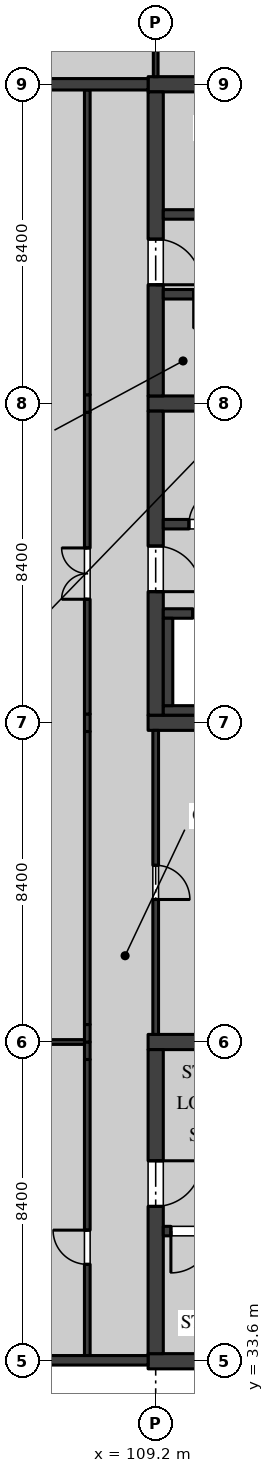
"""IFC4 building model, lengths in metres.
Left out: names, types, materials, properties, quantities, classifications, styles, units other than length and angle.
Written with IfcOpenShell. Run it as: python <this file> out.ifc"""

import sys

from ifc_helpers import new_model, si_unit, direction, frame, frame_2d, origin, place, context, subcontext, project, spatial, rectangle, extrude, element, fill, save


model = new_model("IFC4")
c1 = context("Model", 3, precision=1e-05, world=origin(), true_north=direction((0.0, 1.0)))
c2 = subcontext(c1, "Body", "Model", "MODEL_VIEW")
j1 = project(units=[si_unit("LENGTHUNIT", "METRE"), si_unit("PLANEANGLEUNIT", "RADIAN")], contexts=[c1])
p1 = place(None, origin())
s1 = spatial("IfcSite", under=j1, at=p1, CompositionType="ELEMENT")
p2 = place(p1, origin())
s2 = spatial("IfcBuilding", under=s1, at=p2, CompositionType="ELEMENT")
p3 = place(p2, frame((0.0, 0.0, 9.9)))
s3 = spatial("IfcBuildingStorey", under=s2, at=p3, CompositionType="ELEMENT", Elevation=9.9)
p4 = place(p3, frame((109.0, 50.4, 0.0), z_axis=(0.0, 0.0, 1.0), x_axis=(1.0, 0.0, 0.0)))
e1 = element("IfcWall", 1, at=p4, inside=s3, PredefinedType="SHEAR", context=c2, shape_type="SweptSolid", body=[
    extrude(rectangle(XDim=8.8, YDim=0.4, at=frame_2d((4.4, 0.0))), origin(), (0.0, 0.0, 1.0), 4.37),
])
p5 = place(p3, frame((109.0, 58.8, 0.0), z_axis=(0.0, 0.0, 1.0), x_axis=(1.0, 0.0, 0.0)))
e2 = element("IfcWall", 2, at=p5, inside=s3, PredefinedType="SHEAR", context=c2, shape_type="SweptSolid", body=[
    extrude(rectangle(XDim=8.8, YDim=0.4, at=frame_2d((4.4, 0.0))), origin(), (0.0, 0.0, 1.0), 4.37),
])
p6 = place(p5, frame((6.65, 0.0, 0.0)))
e3 = element("IfcOpeningElement", 3, at=p6, cuts=e2, PredefinedType="OPENING", context=c2, shape_type="SweptSolid", body=[
    extrude(rectangle(XDim=1.1, YDim=2.1, at=frame_2d((0.55, 1.05))), frame((0.0, 0.21, 0.0), z_axis=(0.0, -1.0, 0.0), x_axis=(1.0, 0.0, 0.0)), (0.0, 0.0, 1.0), 0.42),
])
p7 = place(p3, frame((109.2, 50.6, 0.0), z_axis=(0.0, 0.0, 1.0), x_axis=(0.0, 1.0, 0.0)))
e4 = element("IfcWall", 4, at=p7, inside=s3, PredefinedType="SHEAR", context=c2, shape_type="SweptSolid", body=[
    extrude(rectangle(XDim=8.0, YDim=0.4, at=frame_2d((4.0, 0.0))), origin(), (0.0, 0.0, 1.0), 4.37),
])
p8 = place(p7, frame((3.25, 0.0, 0.0)))
e5 = element("IfcOpeningElement", 5, at=p8, cuts=e4, PredefinedType="OPENING", context=c2, shape_type="SweptSolid", body=[
    extrude(rectangle(XDim=1.2, YDim=2.1, at=frame_2d((0.6, 1.05))), frame((0.0, 0.21, 0.0), z_axis=(0.0, -1.0, 0.0), x_axis=(1.0, 0.0, 0.0)), (0.0, 0.0, 1.0), 0.42),
])
p9 = place(p3, frame((109.4, 55.625, 0.0), z_axis=(0.0, 0.0, 1.0), x_axis=(1.0, 0.0, 0.0)))
e6 = element("IfcWall", 6, at=p9, inside=s3, PredefinedType="SOLIDWALL", context=c2, shape_type="SweptSolid", body=[
    extrude(rectangle(XDim=2.25, YDim=0.25, at=frame_2d((1.125, 0.0))), origin(), (0.0, 0.0, 1.0), 4.37),
])
p10 = place(p9, frame((0.675, 0.0, 0.0)))
e7 = element("IfcOpeningElement", 7, at=p10, cuts=e6, PredefinedType="OPENING", context=c2, shape_type="SweptSolid", body=[
    extrude(rectangle(XDim=0.9, YDim=2.1, at=frame_2d((0.45, 1.05))), frame((0.0, 0.135, 0.0), z_axis=(0.0, -1.0, 0.0), x_axis=(1.0, 0.0, 0.0)), (0.0, 0.0, 1.0), 0.27),
])
p11 = place(p3, frame((109.0, 67.2, 0.0), z_axis=(0.0, 0.0, 1.0), x_axis=(1.0, 0.0, 0.0)))
e8 = element("IfcWall", 8, at=p11, inside=s3, PredefinedType="SHEAR", context=c2, shape_type="SweptSolid", body=[
    extrude(rectangle(XDim=8.8, YDim=0.4, at=frame_2d((4.4, 0.0))), origin(), (0.0, 0.0, 1.0), 4.37),
])
p12 = place(p3, frame((109.2, 59.0, 0.0), z_axis=(0.0, 0.0, 1.0), x_axis=(0.0, 1.0, 0.0)))
e9 = element("IfcWall", 9, at=p12, inside=s3, PredefinedType="SHEAR", context=c2, shape_type="SweptSolid", body=[
    extrude(rectangle(XDim=8.0, YDim=0.4, at=frame_2d((4.0, 0.0))), origin(), (0.0, 0.0, 1.0), 4.37),
])
p13 = place(p12, frame((2.925, 0.0, 0.0)))
e10 = element("IfcOpeningElement", 10, at=p13, cuts=e9, PredefinedType="OPENING", context=c2, shape_type="SweptSolid", body=[
    extrude(rectangle(XDim=1.2, YDim=2.1, at=frame_2d((0.6, 1.05))), frame((0.0, 0.21, 0.0), z_axis=(0.0, -1.0, 0.0), x_axis=(1.0, 0.0, 0.0)), (0.0, 0.0, 1.0), 0.42),
])
p14 = place(p3, frame((117.4, 63.775, 0.0), z_axis=(0.0, 0.0, 1.0), x_axis=(-1.0, 0.0, 0.0)))
e11 = element("IfcWall", 11, at=p14, inside=s3, PredefinedType="SOLIDWALL", context=c2, shape_type="SweptSolid", body=[
    extrude(rectangle(XDim=8.0, YDim=0.25, at=frame_2d((4.0, 0.0))), origin(), (0.0, 0.0, 1.0), 4.37),
])
p15 = place(p14, frame((0.2, 0.0, 0.0)))
e12 = element("IfcOpeningElement", 12, at=p15, cuts=e11, PredefinedType="OPENING", context=c2, shape_type="SweptSolid", body=[
    extrude(rectangle(XDim=1.1, YDim=2.1, at=frame_2d((0.55, 1.05))), frame((0.0, 0.135, 0.0), z_axis=(0.0, -1.0, 0.0), x_axis=(1.0, 0.0, 0.0)), (0.0, 0.0, 1.0), 0.27),
])
p16 = place(p3, frame((114.75, 61.675, 0.0), z_axis=(0.0, 0.0, 1.0), x_axis=(-1.0, 0.0, 0.0)))
e13 = element("IfcWall", 13, at=p16, inside=s3, PredefinedType="SOLIDWALL", context=c2, shape_type="SweptSolid", body=[
    extrude(rectangle(XDim=5.35, YDim=0.25, at=frame_2d((2.675, 0.0))), origin(), (0.0, 0.0, 1.0), 4.37),
])
p17 = place(p16, frame((3.65, 0.0, 0.0)))
e14 = element("IfcOpeningElement", 14, at=p17, cuts=e13, PredefinedType="OPENING", context=c2, shape_type="SweptSolid", body=[
    extrude(rectangle(XDim=0.9, YDim=2.1, at=frame_2d((0.45, 1.05))), frame((0.0, 0.135, 0.0), z_axis=(0.0, -1.0, 0.0), x_axis=(1.0, 0.0, 0.0)), (0.0, 0.0, 1.0), 0.27),
])
p18 = place(p16, frame((0.9, 0.0, 0.0)))
e15 = element("IfcOpeningElement", 15, at=p18, cuts=e13, PredefinedType="OPENING", context=c2, shape_type="SweptSolid", body=[
    extrude(rectangle(XDim=0.8, YDim=2.1, at=frame_2d((0.4, 1.05))), frame((0.0, 0.135, 0.0), z_axis=(0.0, -1.0, 0.0), x_axis=(1.0, 0.0, 0.0)), (0.0, 0.0, 1.0), 0.27),
])
for number, where, z_axis, x_axis in (
    (16, (109.0, 33.6, 0.0), (0.0, 0.0, 1.0), (1.0, 0.0, 0.0)),
    (17, (109.0, 42.0, 0.0), (0.0, 0.0, 1.0), (1.0, 0.0, 0.0)),
):
    element("IfcWall", number, at=place(p3, frame(where, z_axis=z_axis, x_axis=x_axis)), inside=s3, PredefinedType="SHEAR", context=c2, shape_type="SweptSolid", body=[
        extrude(rectangle(XDim=8.8, YDim=0.4, at=frame_2d((4.4, 0.0))), origin(), (0.0, 0.0, 1.0), 4.37),
    ])
p19 = place(p3, frame((109.2, 33.8, 0.0), z_axis=(0.0, 0.0, 1.0), x_axis=(0.0, 1.0, 0.0)))
e18 = element("IfcWall", 18, at=p19, inside=s3, PredefinedType="SHEAR", context=c2, shape_type="SweptSolid", body=[
    extrude(rectangle(XDim=8.0, YDim=0.4, at=frame_2d((4.0, 0.0))), origin(), (0.0, 0.0, 1.0), 4.37),
])
p20 = place(p19, frame((3.875, 0.0, 0.0)))
e19 = element("IfcOpeningElement", 19, at=p20, cuts=e18, PredefinedType="OPENING", context=c2, shape_type="SweptSolid", body=[
    extrude(rectangle(XDim=1.2, YDim=2.1, at=frame_2d((0.6, 1.05))), frame((0.0, 0.21, 0.0), z_axis=(0.0, -1.0, 0.0), x_axis=(1.0, 0.0, 0.0)), (0.0, 0.0, 1.0), 0.42),
])
p21 = place(p3, frame((109.4, 37.025, 0.0), z_axis=(0.0, 0.0, 1.0), x_axis=(1.0, 0.0, 0.0)))
e20 = element("IfcWall", 20, at=p21, inside=s3, PredefinedType="SOLIDWALL", context=c2, shape_type="SweptSolid", body=[
    extrude(rectangle(XDim=8.0, YDim=0.25, at=frame_2d((4.0, 0.0))), origin(), (0.0, 0.0, 1.0), 4.37),
])
p22 = place(p21, frame((0.2, 0.0, 0.0)))
e21 = element("IfcOpeningElement", 21, at=p22, cuts=e20, PredefinedType="OPENING", context=c2, shape_type="SweptSolid", body=[
    extrude(rectangle(XDim=1.1, YDim=2.1, at=frame_2d((0.55, 1.05))), frame((0.0, 0.135, 0.0), z_axis=(0.0, -1.0, 0.0), x_axis=(1.0, 0.0, 0.0)), (0.0, 0.0, 1.0), 0.27),
])
p23 = place(p3, frame((109.4, 53.275, 0.0), z_axis=(0.0, 0.0, 1.0), x_axis=(1.0, 0.0, 0.0)))
e22 = element("IfcWall", 22, at=p23, inside=s3, PredefinedType="SOLIDWALL", context=c2, shape_type="SweptSolid", body=[
    extrude(rectangle(XDim=2.65, YDim=0.25, at=frame_2d((1.325, 0.0))), origin(), (0.0, 0.0, 1.0), 4.37),
])
p24 = place(p23, frame((0.775, 0.0, 0.0)))
e23 = element("IfcOpeningElement", 23, at=p24, cuts=e22, PredefinedType="OPENING", context=c2, shape_type="SweptSolid", body=[
    extrude(rectangle(XDim=1.1, YDim=2.1, at=frame_2d((0.55, 1.05))), frame((0.0, 0.135, 0.0), z_axis=(0.0, -1.0, 0.0), x_axis=(1.0, 0.0, 0.0)), (0.0, 0.0, 1.0), 0.27),
])
p25 = place(p3, frame((109.4, 50.725, 0.0), z_axis=(0.0, 0.0, 1.0), x_axis=(1.0, 0.0, 0.0)))
e24 = element("IfcWall", 24, at=p25, inside=s3, PredefinedType="SOLIDWALL", context=c2, shape_type="SweptSolid", body=[
    extrude(rectangle(XDim=2.65, YDim=0.25, at=frame_2d((1.325, 0.0))), origin(), (0.0, 0.0, 1.0), 4.37),
])
p26 = place(p3, frame((109.525, 50.85, 0.0), z_axis=(0.0, 0.0, 1.0), x_axis=(0.0, 1.0, 0.0)))
e25 = element("IfcWall", 25, at=p26, inside=s3, PredefinedType="SOLIDWALL", context=c2, shape_type="SweptSolid", body=[
    extrude(rectangle(XDim=2.3, YDim=0.25, at=frame_2d((1.15, 0.0))), origin(), (0.0, 0.0, 1.0), 4.37),
])
p27 = place(p3, frame((109.2, 42.2, 0.0), z_axis=(0.0, 0.0, 1.0), x_axis=(0.0, 1.0, 0.0)))
e26 = element("IfcWall", 26, at=p27, inside=s3, PredefinedType="PARTITIONING", context=c2, shape_type="SweptSolid", body=[
    extrude(rectangle(XDim=8.0, YDim=0.15, at=frame_2d((4.0, 0.0))), origin(), (0.0, 0.0, 1.0), 3.746),
])
p28 = place(p27, frame((3.55, 0.0, 0.0)))
e27 = element("IfcOpeningElement", 27, at=p28, cuts=e26, PredefinedType="OPENING", context=c2, shape_type="SweptSolid", body=[
    extrude(rectangle(XDim=0.9, YDim=2.1, at=frame_2d((0.45, 1.05))), frame((0.0, 0.085, 0.0), z_axis=(0.0, -1.0, 0.0), x_axis=(1.0, 0.0, 0.0)), (0.0, 0.0, 1.0), 0.17),
])
p29 = place(p3, frame((107.4, 33.75, 0.0), z_axis=(0.0, 0.0, 1.0), x_axis=(0.0, 1.0, 0.0)))
e28 = element("IfcWall", 28, at=p29, inside=s3, PredefinedType="PARTITIONING", context=c2, shape_type="SweptSolid", body=[
    extrude(rectangle(XDim=7.79, YDim=0.15, at=frame_2d((3.895, 0.0))), origin(), (0.0, 0.0, 1.0), 4.37),
])
p30 = place(p29, frame((2.4, 0.0, 0.0)))
e29 = element("IfcOpeningElement", 29, at=p30, cuts=e28, PredefinedType="OPENING", context=c2, shape_type="SweptSolid", body=[
    extrude(rectangle(XDim=0.9, YDim=2.1, at=frame_2d((0.45, 1.05))), frame((0.0, 0.085, 0.0), z_axis=(0.0, -1.0, 0.0), x_axis=(1.0, 0.0, 0.0)), (0.0, 0.0, 1.0), 0.17),
])
for number, where, z_axis, x_axis in (
    (30, (107.4, 41.54, 0.0), (0.0, 0.0, 1.0), (0.0, 1.0, 0.0)),
    (31, (107.4, 42.0, 0.0), (0.0, 0.0, 1.0), (0.0, 1.0, 0.0)),
):
    element("IfcWall", number, at=place(p3, frame(where, z_axis=z_axis, x_axis=x_axis)), inside=s3, PredefinedType="PARTITIONING", context=c2, shape_type="SweptSolid", body=[
        extrude(rectangle(XDim=0.46, YDim=0.15, at=frame_2d((0.23, 0.0))), origin(), (0.0, 0.0, 1.0), 3.746),
    ])
p31 = place(p3, frame((107.4, 42.46, 0.0), z_axis=(0.0, 0.0, 1.0), x_axis=(0.0, 1.0, 0.0)))
e32 = element("IfcWall", 32, at=p31, inside=s3, PredefinedType="PARTITIONING", context=c2, shape_type="SweptSolid", body=[
    extrude(rectangle(XDim=7.71, YDim=0.15, at=frame_2d((3.855, 0.0))), origin(), (0.0, 0.0, 1.0), 4.37),
])
p32 = place(p3, frame((107.4, 50.17, 0.0), z_axis=(0.0, 0.0, 1.0), x_axis=(0.0, 1.0, 0.0)))
e33 = element("IfcWall", 33, at=p32, inside=s3, PredefinedType="PARTITIONING", context=c2, shape_type="SweptSolid", body=[
    extrude(rectangle(XDim=0.46, YDim=0.15, at=frame_2d((0.23, 0.0))), origin(), (0.0, 0.0, 1.0), 3.746),
])
p33 = place(p3, frame((107.4, 50.63, 0.0), z_axis=(0.0, 0.0, 1.0), x_axis=(0.0, 1.0, 0.0)))
e34 = element("IfcWall", 34, at=p33, inside=s3, PredefinedType="PARTITIONING", context=c2, shape_type="SweptSolid", body=[
    extrude(rectangle(XDim=7.94, YDim=0.15, at=frame_2d((3.97, 0.0))), origin(), (0.0, 0.0, 1.0), 4.37),
])
p34 = place(p33, frame((3.02, 0.0, 0.0)))
e35 = element("IfcOpeningElement", 35, at=p34, cuts=e34, PredefinedType="OPENING", context=c2, shape_type="SweptSolid", body=[
    extrude(rectangle(XDim=1.35, YDim=2.1, at=frame_2d((0.675, 1.05))), frame((0.0, 0.085, 0.0), z_axis=(0.0, -1.0, 0.0), x_axis=(1.0, 0.0, 0.0)), (0.0, 0.0, 1.0), 0.17),
])
p35 = place(p3, frame((107.4, 58.57, 0.0), z_axis=(0.0, 0.0, 1.0), x_axis=(0.0, 1.0, 0.0)))
e36 = element("IfcWall", 36, at=p35, inside=s3, PredefinedType="PARTITIONING", context=c2, shape_type="SweptSolid", body=[
    extrude(rectangle(XDim=0.46, YDim=0.15, at=frame_2d((0.23, 0.0))), origin(), (0.0, 0.0, 1.0), 3.746),
])
p36 = place(p3, frame((107.4, 59.03, 0.0), z_axis=(0.0, 0.0, 1.0), x_axis=(0.0, 1.0, 0.0)))
e37 = element("IfcWall", 37, at=p36, inside=s3, PredefinedType="PARTITIONING", context=c2, shape_type="SweptSolid", body=[
    extrude(rectangle(XDim=8.02, YDim=0.15, at=frame_2d((4.01, 0.0))), origin(), (0.0, 0.0, 1.0), 4.37),
])
p37 = place(p3, frame((105.0, 42.0, 0.0), z_axis=(0.0, 0.0, 1.0), x_axis=(1.0, 0.0, 0.0)))
e38 = element("IfcWall", 38, at=p37, inside=s3, PredefinedType="PARTITIONING", context=c2, shape_type="SweptSolid", body=[
    extrude(rectangle(XDim=2.325, YDim=0.125, at=frame_2d((1.163, 0.0))), origin(), (0.0, 0.0, 1.0), 3.746),
])
p38 = place(p3, frame((109.2, 67.4, 0.0), z_axis=(0.0, 0.0, 1.0), x_axis=(0.0, 1.0, 0.0)))
e39 = element("IfcWall", 39, at=p38, inside=s3, PredefinedType="PARTITIONING", context=c2, shape_type="SweptSolid", body=[
    extrude(rectangle(XDim=6.625, YDim=0.125, at=frame_2d((3.312, 0.0))), origin(), (0.0, 0.0, 1.0), 3.746),
])
p39 = place(p3, frame((100.802, 33.625, 0.0), z_axis=(0.0, 0.0, 1.0), x_axis=(1.0, 0.0, 0.0)))
e40 = element("IfcWall", 40, at=p39, inside=s3, PredefinedType="SOLIDWALL", context=c2, shape_type="SweptSolid", body=[
    extrude(rectangle(XDim=8.198, YDim=0.25, at=frame_2d((4.099, 0.0))), origin(), (0.0, 0.0, 1.0), 3.746),
])
p40 = place(p39, frame((1.649, 0.0, 1.5)))
e41 = element("IfcOpeningElement", 41, at=p40, cuts=e40, PredefinedType="OPENING", context=c2, shape_type="SweptSolid", body=[
    extrude(rectangle(XDim=0.9, YDim=1.2, at=frame_2d((0.45, 0.6))), frame((0.0, 0.135, 0.0), z_axis=(0.0, -1.0, 0.0), x_axis=(1.0, 0.0, 0.0)), (0.0, 0.0, 1.0), 0.27),
])
p41 = place(p3, frame((109.0, 67.2, 0.0), z_axis=(0.0, 0.0, 1.0), x_axis=(-1.0, 0.0, 0.0)))
e42 = element("IfcWall", 42, at=p41, inside=s3, PredefinedType="SOLIDWALL", context=c2, shape_type="SweptSolid", body=[
    extrude(rectangle(XDim=8.198, YDim=0.3, at=frame_2d((4.099, 0.0))), origin(), (0.0, 0.0, 1.0), 3.746),
])
p42 = place(p8, frame((1.2, 0.0, 0.0), z_axis=(0.0, 0.0, 1.0), x_axis=(-1.0, 0.0, 0.0)))
e43 = element("IfcDoor", 43, at=p42, inside=s3, OperationType="SINGLE_SWING_LEFT", PredefinedType="DOOR", context=c2, shape_type="SweptSolid", body=[
    extrude(rectangle(XDim=1.2, YDim=2.1, at=frame_2d((0.6, 1.05))), frame((0.0, 0.035, 0.0), z_axis=(0.0, -1.0, 0.0), x_axis=(1.0, 0.0, 0.0)), (0.0, 0.0, 1.0), 0.07),
])
fill(e5, e43)
p43 = place(p10, origin())
e44 = element("IfcDoor", 44, at=p43, inside=s3, OperationType="SINGLE_SWING_LEFT", PredefinedType="DOOR", context=c2, shape_type="SweptSolid", body=[
    extrude(rectangle(XDim=0.9, YDim=2.1, at=frame_2d((0.45, 1.05))), frame((0.0, 0.05, 0.0), z_axis=(0.0, -1.0, 0.0), x_axis=(1.0, 0.0, 0.0)), (0.0, 0.0, 1.0), 0.1),
])
fill(e7, e44)
p44 = place(p13, frame((1.2, 0.0, 0.0), z_axis=(0.0, 0.0, 1.0), x_axis=(-1.0, 0.0, 0.0)))
e45 = element("IfcDoor", 45, at=p44, inside=s3, OperationType="SINGLE_SWING_LEFT", PredefinedType="DOOR", context=c2, shape_type="SweptSolid", body=[
    extrude(rectangle(XDim=1.2, YDim=2.1, at=frame_2d((0.6, 1.05))), frame((0.0, 0.035, 0.0), z_axis=(0.0, -1.0, 0.0), x_axis=(1.0, 0.0, 0.0)), (0.0, 0.0, 1.0), 0.07),
])
fill(e10, e45)
p45 = place(p20, frame((1.2, 0.0, 0.0), z_axis=(0.0, 0.0, 1.0), x_axis=(-1.0, 0.0, 0.0)))
e46 = element("IfcDoor", 46, at=p45, inside=s3, OperationType="SINGLE_SWING_RIGHT", PredefinedType="DOOR", context=c2, shape_type="SweptSolid", body=[
    extrude(rectangle(XDim=1.2, YDim=2.1, at=frame_2d((0.6, 1.05))), frame((0.0, 0.035, 0.0), z_axis=(0.0, -1.0, 0.0), x_axis=(1.0, 0.0, 0.0)), (0.0, 0.0, 1.0), 0.07),
])
fill(e19, e46)
p46 = place(p22, frame((1.1, 0.0, 0.0), z_axis=(0.0, 0.0, 1.0), x_axis=(-1.0, 0.0, 0.0)))
e47 = element("IfcDoor", 47, at=p46, inside=s3, OperationType="SINGLE_SWING_LEFT", PredefinedType="DOOR", context=c2, shape_type="SweptSolid", body=[
    extrude(rectangle(XDim=1.1, YDim=2.1, at=frame_2d((0.55, 1.05))), frame((0.0, 0.035, 0.0), z_axis=(0.0, -1.0, 0.0), x_axis=(1.0, 0.0, 0.0)), (0.0, 0.0, 1.0), 0.07),
])
fill(e21, e47)
p47 = place(p24, origin())
e48 = element("IfcDoor", 48, at=p47, inside=s3, OperationType="DOUBLE_DOOR_SLIDING", PredefinedType="DOOR", context=c2, shape_type="SweptSolid", body=[
    extrude(rectangle(XDim=1.1, YDim=2.1, at=frame_2d((0.55, 1.05))), frame((0.0, 0.04, 0.0), z_axis=(0.0, -1.0, 0.0), x_axis=(1.0, 0.0, 0.0)), (0.0, 0.0, 1.0), 0.08),
])
fill(e23, e48)
p48 = place(p28, frame((0.9, 0.0, 0.0), z_axis=(0.0, 0.0, 1.0), x_axis=(-1.0, 0.0, 0.0)))
e49 = element("IfcDoor", 49, at=p48, inside=s3, OperationType="SINGLE_SWING_LEFT", PredefinedType="DOOR", context=c2, shape_type="SweptSolid", body=[
    extrude(rectangle(XDim=0.9, YDim=2.1, at=frame_2d((0.45, 1.05))), frame((0.0, 0.025, 0.0), z_axis=(0.0, -1.0, 0.0), x_axis=(1.0, 0.0, 0.0)), (0.0, 0.0, 1.0), 0.05),
])
fill(e27, e49)
p49 = place(p30, origin())
e50 = element("IfcDoor", 50, at=p49, inside=s3, OperationType="SINGLE_SWING_LEFT", PredefinedType="DOOR", context=c2, shape_type="SweptSolid", body=[
    extrude(rectangle(XDim=0.9, YDim=2.1, at=frame_2d((0.45, 1.05))), frame((0.0, 0.025, 0.0), z_axis=(0.0, -1.0, 0.0), x_axis=(1.0, 0.0, 0.0)), (0.0, 0.0, 1.0), 0.05),
])
fill(e29, e50)
p50 = place(p34, origin())
e51 = element("IfcDoor", 51, at=p50, inside=s3, OperationType="DOUBLE_DOOR_SINGLE_SWING", PredefinedType="DOOR", context=c2, shape_type="SweptSolid", body=[
    extrude(rectangle(XDim=1.35, YDim=2.1, at=frame_2d((0.675, 1.05))), frame((0.0, 0.025, 0.0), z_axis=(0.0, -1.0, 0.0), x_axis=(1.0, 0.0, 0.0)), (0.0, 0.0, 1.0), 0.05),
])
fill(e35, e51)
save(model, sys.argv[1])
